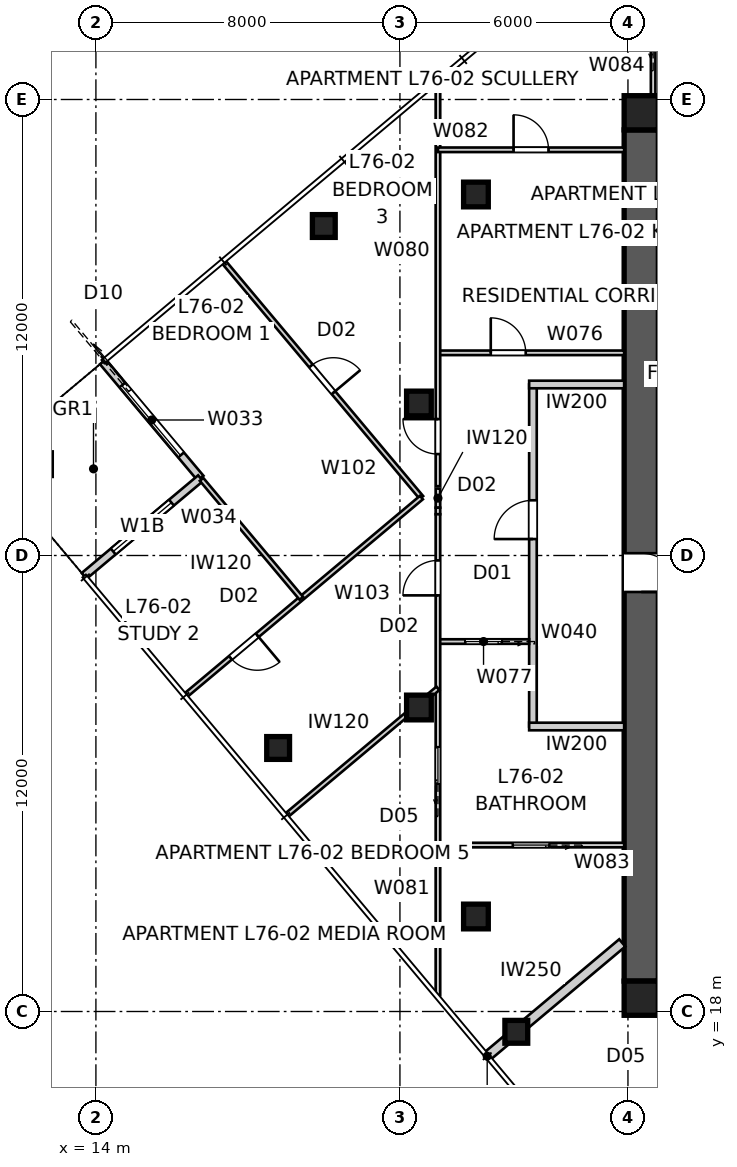
"""IFC4 building model, lengths in metres.
Left out: names, types, materials, properties, quantities, classifications, styles, units other than length and angle.
Written with IfcOpenShell. Run it as: python <this file> out.ifc"""

import sys

from ifc_helpers import new_model, si_unit, direction, frame, frame_2d, origin, origin_2d, place, context, subcontext, project, spatial, polyline, rectangle, outline, extrude, element, fill, save


model = new_model("IFC4")
c1 = context("Model", 3, precision=1e-05, world=origin(), true_north=direction((0.0, 1.0)))
c2 = subcontext(c1, "Body", "Model", "MODEL_VIEW")
j1 = project(units=[si_unit("LENGTHUNIT", "METRE"), si_unit("PLANEANGLEUNIT", "RADIAN")], contexts=[c1])
p1 = place(None, origin())
s1 = spatial("IfcSite", under=j1, at=p1, CompositionType="ELEMENT")
p2 = place(p1, origin())
s2 = spatial("IfcBuilding", under=s1, at=p2, CompositionType="ELEMENT")
p3 = place(p2, frame((0.0, 0.0, 276.0)))
s3 = spatial("IfcBuildingStorey", under=s2, at=p3, CompositionType="ELEMENT", Elevation=276.0)
for number, where, z_axis, x_axis in (
    (1, (28.8, 41.65, 0.0), (0.0, 0.0, 1.0), (1.0, 0.0, 0.0)),
    (2, (51.2, 18.35, 0.0), (0.0, 0.0, 1.0), (-1.0, 0.0, 0.0)),
):
    element("IfcWall", number, at=place(p3, frame(where, z_axis=z_axis, x_axis=x_axis)), inside=s3, PredefinedType="SHEAR", context=c2, shape_type="SweptSolid", body=[
        extrude(outline(polyline([(0.0, -0.45), (22.4, -0.45), (22.4, -0.025), (22.85, -0.025), (22.85, 0.025), (22.4, 0.025), (22.4, 0.45), (0.0, 0.45), (0.0, 0.025), (-0.45, 0.025), (-0.45, -0.025), (0.0, -0.025), (0.0, -0.45)])), origin(), (0.0, 0.0, 1.0), 3.4),
    ])
p4 = place(p3, frame((28.35, 41.2, 0.0), z_axis=(0.0, 0.0, 1.0), x_axis=(0.0, -1.0, 0.0)))
e3 = element("IfcWall", 3, at=p4, inside=s3, PredefinedType="SHEAR", context=c2, shape_type="SweptSolid", body=[
    extrude(outline(polyline([(0.0, -0.45), (22.4, -0.45), (22.4, -0.025), (22.85, -0.025), (22.85, 0.025), (22.4, 0.025), (22.4, 0.45), (0.0, 0.45), (0.0, 0.025), (-0.45, 0.025), (-0.45, -0.025), (0.0, -0.025), (0.0, -0.45)])), origin(), (0.0, 0.0, 1.0), 3.4),
])
p5 = place(p4, frame((11.14, 0.0, 0.0)))
e4 = element("IfcOpeningElement", 4, at=p5, cuts=e3, PredefinedType="OPENING", context=c2, shape_type="SweptSolid", body=[
    extrude(rectangle(XDim=1.02, YDim=2.4, at=frame_2d((0.51, 1.2))), frame((0.0, 0.46, 0.0), z_axis=(0.0, -1.0, 0.0), x_axis=(1.0, 0.0, 0.0)), (0.0, 0.0, 1.0), 0.92),
])
for number, where, z_axis, x_axis in (
    (5, (28.35, 18.35, 0.0), (0.0, 0.0, 1.0), (1.0, 0.0, 0.0)),
    (6, (28.35, 41.65, 0.0), (0.0, 0.0, 1.0), (1.0, 0.0, 0.0)),
):
    element("IfcColumn", number, at=place(p3, frame(where, z_axis=z_axis, x_axis=x_axis)), inside=s3, PredefinedType="COLUMN", context=c2, shape_type="SweptSolid", body=[
        extrude(rectangle(XDim=0.9, YDim=0.9, at=origin_2d()), origin(), (0.0, 0.0, 1.0), 3.4),
    ])
for number, where, z_axis, x_axis in (
    (7, (19.997, 38.671, 0.0), (0.0, 0.0, 1.0), (1.0, 0.0, 0.0)),
    (8, (18.795, 24.935, 0.0), (0.0, 0.0, 1.0), (1.0, 0.0, 0.0)),
    (9, (25.062, 17.466, 0.0), (0.0, 0.0, 1.0), (1.0, 0.0, 0.0)),
):
    element("IfcColumn", number, at=place(p3, frame(where, z_axis=z_axis, x_axis=x_axis)), inside=s3, PredefinedType="COLUMN", context=c2, shape_type="SweptSolid", body=[
        extrude(rectangle(XDim=0.6, YDim=0.6, at=origin_2d()), origin(), (0.0, 0.0, 1.0), 3.4),
    ])
for number, where, z_axis, x_axis in (
    (10, (24.0, 39.5, 0.0), (0.0, 0.0, 1.0), (1.0, 0.0, 0.0)),
    (11, (22.5, 34.0, 0.0), (0.0, 0.0, 1.0), (1.0, 0.0, 0.0)),
    (12, (22.5, 26.0, 0.0), (0.0, 0.0, 1.0), (1.0, 0.0, 0.0)),
    (13, (24.0, 20.5, 0.0), (0.0, 0.0, 1.0), (1.0, 0.0, 0.0)),
):
    element("IfcColumn", number, at=place(p3, frame(where, z_axis=z_axis, x_axis=x_axis)), inside=s3, PredefinedType="COLUMN", context=c2, shape_type="SweptSolid", body=[
        extrude(rectangle(XDim=0.65, YDim=0.65, at=origin_2d()), origin(), (0.0, 0.0, 1.0), 3.4),
    ])
p6 = place(p3, frame((14.183, 35.098, 0.0), z_axis=(0.0, 0.0, 1.0), x_axis=(0.642768287094, -0.766060656284, 0.0)))
e14 = element("IfcWall", 14, at=p6, inside=s3, PredefinedType="SOLIDWALL", context=c2, shape_type="SweptSolid", body=[
    extrude(rectangle(XDim=4.0, YDim=0.2, at=frame_2d((2.0, 0.0))), origin(), (0.0, 0.0, 1.0), 3.25),
])
p7 = place(p6, frame((0.8, 0.0, 0.0)))
e15 = element("IfcOpeningElement", 15, at=p7, cuts=e14, PredefinedType="OPENING", context=c2, shape_type="SweptSolid", body=[
    extrude(rectangle(XDim=2.4, YDim=2.4, at=frame_2d((1.2, 1.2))), frame((0.0, 0.11, 0.0), z_axis=(0.0, -1.0, 0.0), x_axis=(1.0, 0.0, 0.0)), (0.0, 0.0, 1.0), 0.22),
])
p8 = place(p3, frame((16.754, 32.034, 0.0), z_axis=(0.0, 0.0, 1.0), x_axis=(-0.766035437498, -0.642798342015, 0.0)))
e16 = element("IfcWall", 16, at=p8, inside=s3, PredefinedType="SOLIDWALL", context=c2, shape_type="SweptSolid", body=[
    extrude(rectangle(XDim=4.0, YDim=0.2, at=frame_2d((2.0, 0.0))), origin(), (0.0, 0.0, 1.0), 3.25),
])
p9 = place(p8, frame((1.0, 0.0, 0.45)))
e17 = element("IfcOpeningElement", 17, at=p9, cuts=e16, PredefinedType="OPENING", context=c2, shape_type="SweptSolid", body=[
    extrude(rectangle(XDim=2.0, YDim=1.8, at=frame_2d((1.0, 0.9))), frame((0.0, 0.11, 0.0), z_axis=(0.0, -1.0, 0.0), x_axis=(1.0, 0.0, 0.0)), (0.0, 0.0, 1.0), 0.22),
])
p10 = place(p3, frame((25.5, 25.5, 0.0), z_axis=(0.0, 0.0, 1.0), x_axis=(0.0, 1.0, 0.0)))
e18 = element("IfcWall", 18, at=p10, inside=s3, PredefinedType="PARTITIONING", context=c2, shape_type="SweptSolid", body=[
    extrude(rectangle(XDim=9.0, YDim=0.2, at=frame_2d((4.5, 0.0))), origin(), (0.0, 0.0, 1.0), 3.25),
])
p11 = place(p10, frame((4.933, 0.0, 0.0)))
e19 = element("IfcOpeningElement", 19, at=p11, cuts=e18, PredefinedType="OPENING", context=c2, shape_type="SweptSolid", body=[
    extrude(rectangle(XDim=1.02, YDim=2.34, at=frame_2d((0.51, 1.17))), frame((0.0, 0.11, 0.0), z_axis=(0.0, -1.0, 0.0), x_axis=(1.0, 0.0, 0.0)), (0.0, 0.0, 1.0), 0.22),
])
for number, where, z_axis, x_axis in (
    (20, (27.9, 34.5, 0.0), (0.0, 0.0, 1.0), (-1.0, 0.0, 0.0)),
    (21, (27.9, 25.5, 0.0), (0.0, 0.0, 1.0), (-1.0, 0.0, 0.0)),
):
    element("IfcWall", number, at=place(p3, frame(where, z_axis=z_axis, x_axis=x_axis)), inside=s3, PredefinedType="PARTITIONING", context=c2, shape_type="SweptSolid", body=[
        extrude(rectangle(XDim=2.5, YDim=0.2, at=frame_2d((1.25, 0.0))), origin(), (0.0, 0.0, 1.0), 3.25),
    ])
p12 = place(p3, frame((24.296, 16.823, 0.0), z_axis=(0.0, 0.0, 1.0), x_axis=(0.76603440109, 0.64279957712, 0.0)))
e22 = element("IfcWall", 22, at=p12, inside=s3, PredefinedType="PARTITIONING", context=c2, shape_type="SweptSolid", body=[
    extrude(rectangle(XDim=4.64, YDim=0.25, at=frame_2d((2.32, 0.0))), origin(), (0.0, 0.0, 1.0), 3.25),
])
p13 = place(p3, frame((23.0, 35.333, 0.0), z_axis=(0.0, 0.0, 1.0), x_axis=(1.0, 0.0, 0.0)))
e23 = element("IfcWall", 23, at=p13, inside=s3, PredefinedType="PARTITIONING", context=c2, shape_type="SweptSolid", body=[
    extrude(rectangle(XDim=4.9, YDim=0.12, at=frame_2d((2.45, 0.0))), origin(), (0.0, 0.0, 1.0), 3.25),
])
p14 = place(p13, frame((1.39, 0.0, 0.0)))
e24 = element("IfcOpeningElement", 24, at=p14, cuts=e23, PredefinedType="OPENING", context=c2, shape_type="SweptSolid", body=[
    extrude(rectangle(XDim=0.92, YDim=2.34, at=frame_2d((0.46, 1.17))), frame((0.0, 0.07, 0.0), z_axis=(0.0, -1.0, 0.0), x_axis=(1.0, 0.0, 0.0)), (0.0, 0.0, 1.0), 0.14),
])
p15 = place(p3, frame((25.4, 27.736, 0.0), z_axis=(0.0, 0.0, 1.0), x_axis=(-1.0, 0.0, 0.0)))
e25 = element("IfcWall", 25, at=p15, inside=s3, PredefinedType="PARTITIONING", context=c2, shape_type="SweptSolid", body=[
    extrude(rectangle(XDim=2.4, YDim=0.12, at=frame_2d((1.2, 0.0))), origin(), (0.0, 0.0, 1.0), 3.25),
])
p16 = place(p15, frame((0.72, 0.0, 0.0)))
e26 = element("IfcOpeningElement", 26, at=p16, cuts=e25, PredefinedType="OPENING", context=c2, shape_type="SweptSolid", body=[
    extrude(rectangle(XDim=0.96, YDim=2.1, at=frame_2d((0.48, 1.05))), frame((0.0, 0.07, 0.0), z_axis=(0.0, -1.0, 0.0), x_axis=(1.0, 0.0, 0.0)), (0.0, 0.0, 1.0), 0.14),
])
p17 = place(p3, frame((23.0, 31.258, 0.0), z_axis=(0.0, 0.0, 1.0), x_axis=(0.0, 1.0, 0.0)))
e27 = element("IfcWall", 27, at=p17, inside=s3, PredefinedType="PARTITIONING", context=c2, shape_type="SweptSolid", body=[
    extrude(rectangle(XDim=0.504, YDim=0.12, at=frame_2d((0.252, 0.0))), origin(), (0.0, 0.0, 1.0), 3.25),
])
p18 = place(p3, frame((23.0, 31.824, 0.0), z_axis=(0.0, 0.0, 1.0), x_axis=(0.0, 1.0, 0.0)))
e28 = element("IfcWall", 28, at=p18, inside=s3, PredefinedType="PARTITIONING", context=c2, shape_type="SweptSolid", body=[
    extrude(rectangle(XDim=10.619, YDim=0.12, at=frame_2d((5.31, 0.0))), origin(), (0.0, 0.0, 1.0), 2.549),
])
p19 = place(p18, frame((0.844, 0.0, 0.0)))
e29 = element("IfcOpeningElement", 29, at=p19, cuts=e28, PredefinedType="OPENING", context=c2, shape_type="SweptSolid", body=[
    extrude(rectangle(XDim=0.92, YDim=2.34, at=frame_2d((0.46, 1.17))), frame((0.0, 0.07, 0.0), z_axis=(0.0, -1.0, 0.0), x_axis=(1.0, 0.0, 0.0)), (0.0, 0.0, 1.0), 0.14),
])
p20 = place(p3, frame((23.0, 18.43, 0.0), z_axis=(0.0, 0.0, 1.0), x_axis=(0.0, 1.0, 0.0)))
e30 = element("IfcWall", 30, at=p20, inside=s3, PredefinedType="PARTITIONING", context=c2, shape_type="SweptSolid", body=[
    extrude(rectangle(XDim=12.656, YDim=0.12, at=frame_2d((6.328, 0.0))), origin(), (0.0, 0.0, 1.0), 2.549),
])
p21 = place(p20, frame((10.521, 0.0, 0.0)))
e31 = element("IfcOpeningElement", 31, at=p21, cuts=e30, PredefinedType="OPENING", context=c2, shape_type="SweptSolid", body=[
    extrude(rectangle(XDim=0.92, YDim=2.34, at=frame_2d((0.46, 1.17))), frame((0.0, 0.07, 0.0), z_axis=(0.0, -1.0, 0.0), x_axis=(1.0, 0.0, 0.0)), (0.0, 0.0, 1.0), 0.14),
])
p22 = place(p20, frame((5.565, 0.0, 0.0)))
e32 = element("IfcOpeningElement", 32, at=p22, cuts=e30, PredefinedType="OPENING", context=c2, shape_type="SweptSolid", body=[
    extrude(rectangle(XDim=0.96, YDim=2.1, at=frame_2d((0.48, 1.05))), frame((0.0, 0.07, 0.0), z_axis=(0.0, -1.0, 0.0), x_axis=(1.0, 0.0, 0.0)), (0.0, 0.0, 1.0), 0.14),
])
p23 = place(p3, frame((23.0, 40.676, 0.0), z_axis=(0.0, 0.0, 1.0), x_axis=(1.0, 0.0, 0.0)))
e33 = element("IfcWall", 33, at=p23, inside=s3, PredefinedType="PARTITIONING", context=c2, shape_type="SweptSolid", body=[
    extrude(rectangle(XDim=4.9, YDim=0.12, at=frame_2d((2.45, 0.0))), origin(), (0.0, 0.0, 1.0), 3.25),
])
p24 = place(p23, frame((1.99, 0.0, 0.0)))
e34 = element("IfcOpeningElement", 34, at=p24, cuts=e33, PredefinedType="OPENING", context=c2, shape_type="SweptSolid", body=[
    extrude(rectangle(XDim=0.92, YDim=2.1, at=frame_2d((0.46, 1.05))), frame((0.0, 0.07, 0.0), z_axis=(0.0, -1.0, 0.0), x_axis=(1.0, 0.0, 0.0)), (0.0, 0.0, 1.0), 0.14),
])
p25 = place(p3, frame((27.9, 22.38, 0.0), z_axis=(0.0, 0.0, 1.0), x_axis=(-1.0, 0.0, 0.0)))
e35 = element("IfcWall", 35, at=p25, inside=s3, PredefinedType="PARTITIONING", context=c2, shape_type="SweptSolid", body=[
    extrude(rectangle(XDim=4.9, YDim=0.12, at=frame_2d((2.45, 0.0))), origin(), (0.0, 0.0, 1.0), 3.25),
])
p26 = place(p25, frame((1.97, 0.0, 0.0)))
e36 = element("IfcOpeningElement", 36, at=p26, cuts=e35, PredefinedType="OPENING", context=c2, shape_type="SweptSolid", body=[
    extrude(rectangle(XDim=0.96, YDim=2.1, at=frame_2d((0.48, 1.05))), frame((0.0, 0.07, 0.0), z_axis=(0.0, -1.0, 0.0), x_axis=(1.0, 0.0, 0.0)), (0.0, 0.0, 1.0), 0.14),
])
p27 = place(p3, frame((28.663, 41.18, 0.0), z_axis=(0.0, 0.0, 1.0), x_axis=(0.0, 1.0, 0.0)))
e37 = element("IfcWall", 37, at=p27, inside=s3, PredefinedType="PARTITIONING", context=c2, shape_type="SweptSolid", body=[
    extrude(rectangle(XDim=5.82, YDim=0.12, at=frame_2d((2.91, 0.0))), origin(), (0.0, 0.0, 1.0), 3.25),
])
p28 = place(p27, frame((2.44, 0.0, 0.0)))
e38 = element("IfcOpeningElement", 38, at=p28, cuts=e37, PredefinedType="OPENING", context=c2, shape_type="SweptSolid", body=[
    extrude(rectangle(XDim=0.96, YDim=2.1, at=frame_2d((0.48, 1.05))), frame((0.0, 0.07, 0.0), z_axis=(0.0, -1.0, 0.0), x_axis=(1.0, 0.0, 0.0)), (0.0, 0.0, 1.0), 0.14),
])
p29 = place(p3, frame((17.369, 37.719, 0.0), z_axis=(0.0, 0.0, 1.0), x_axis=(0.642800378028, -0.766033729027, 0.0)))
e39 = element("IfcWall", 39, at=p29, inside=s3, PredefinedType="PARTITIONING", context=c2, shape_type="SweptSolid", body=[
    extrude(rectangle(XDim=8.085, YDim=0.12, at=frame_2d((4.042, 0.0))), origin(), (0.0, 0.0, 1.0), 3.25),
])
p30 = place(p29, frame((3.562, 0.0, 0.0)))
e40 = element("IfcOpeningElement", 40, at=p30, cuts=e39, PredefinedType="OPENING", context=c2, shape_type="SweptSolid", body=[
    extrude(rectangle(XDim=0.92, YDim=2.34, at=frame_2d((0.46, 1.17))), frame((0.0, 0.07, 0.0), z_axis=(0.0, -1.0, 0.0), x_axis=(1.0, 0.0, 0.0)), (0.0, 0.0, 1.0), 0.14),
])
p31 = place(p3, frame((22.566, 31.525, 0.0), z_axis=(0.0, 0.0, 1.0), x_axis=(-0.766033729027, -0.642800378028, 0.0)))
e41 = element("IfcWall", 41, at=p31, inside=s3, PredefinedType="PARTITIONING", context=c2, shape_type="SweptSolid", body=[
    extrude(rectangle(XDim=8.085, YDim=0.12, at=frame_2d((4.042, 0.0))), origin(), (0.0, 0.0, 1.0), 3.25),
])
p32 = place(p31, frame((5.64, 0.0, 0.0)))
e42 = element("IfcOpeningElement", 42, at=p32, cuts=e41, PredefinedType="OPENING", context=c2, shape_type="SweptSolid", body=[
    extrude(rectangle(XDim=0.92, YDim=2.34, at=frame_2d((0.46, 1.17))), frame((0.0, 0.07, 0.0), z_axis=(0.0, -1.0, 0.0), x_axis=(1.0, 0.0, 0.0)), (0.0, 0.0, 1.0), 0.14),
])
p33 = place(p3, frame((19.406, 28.874, 0.0), z_axis=(0.0, 0.0, 1.0), x_axis=(-0.642767300664, 0.766061483953, 0.0)))
e43 = element("IfcWall", 43, at=p33, inside=s3, PredefinedType="PARTITIONING", context=c2, shape_type="SweptSolid", body=[
    extrude(rectangle(XDim=4.085, YDim=0.12, at=frame_2d((2.042, 0.0))), origin(), (0.0, 0.0, 1.0), 3.25),
])
p34 = place(p3, frame((23.0, 26.505, 0.0), z_axis=(0.0, 0.0, 1.0), x_axis=(-0.76605407051, -0.642776136034, 0.0)))
e44 = element("IfcWall", 44, at=p34, inside=s3, PredefinedType="PARTITIONING", context=c2, shape_type="SweptSolid", body=[
    extrude(rectangle(XDim=5.191, YDim=0.12, at=frame_2d((2.595, 0.0))), origin(), (0.0, 0.0, 1.0), 3.25),
])
p35 = place(p3, frame((23.0, 31.258, 0.0), z_axis=(0.0, 0.0, 1.0), x_axis=(0.0, -1.0, 0.0)))
e45 = element("IfcWall", 45, at=p35, inside=s3, PredefinedType="PARTITIONING", context=c2, shape_type="SweptSolid", body=[
    extrude(rectangle(XDim=0.172, YDim=0.12, at=frame_2d((0.086, 0.0))), origin(), (0.0, 0.0, 1.0), 3.25),
])
p36 = place(p7, origin())
e46 = element("IfcDoor", 46, at=p36, inside=s3, OperationType="SLIDING_TO_LEFT", PredefinedType="DOOR", context=c2, shape_type="SweptSolid", body=[
    extrude(rectangle(XDim=2.4, YDim=2.4, at=frame_2d((1.2, 1.2))), frame((0.0, 0.025, 0.0), z_axis=(0.0, -1.0, 0.0), x_axis=(1.0, 0.0, 0.0)), (0.0, 0.0, 1.0), 0.05),
])
fill(e15, e46)
p37 = place(p9, origin())
e47 = element("IfcWindow", 47, at=p37, inside=s3, PartitioningType="SINGLE_PANEL", PredefinedType="WINDOW", context=c2, shape_type="SweptSolid", body=[
    extrude(rectangle(XDim=2.0, YDim=1.8, at=frame_2d((1.0, 0.9))), frame((0.0, 0.03, 0.0), z_axis=(0.0, -1.0, 0.0), x_axis=(1.0, 0.0, 0.0)), (0.0, 0.0, 1.0), 0.06),
])
fill(e17, e47)
p38 = place(p11, origin())
e48 = element("IfcDoor", 48, at=p38, inside=s3, OperationType="SINGLE_SWING_LEFT", PredefinedType="DOOR", context=c2, shape_type="SweptSolid", body=[
    extrude(rectangle(XDim=1.02, YDim=2.34, at=frame_2d((0.51, 1.17))), frame((0.0, 0.025, 0.0), z_axis=(0.0, -1.0, 0.0), x_axis=(1.0, 0.0, 0.0)), (0.0, 0.0, 1.0), 0.05),
])
fill(e19, e48)
p39 = place(p14, origin())
e49 = element("IfcDoor", 49, at=p39, inside=s3, OperationType="SINGLE_SWING_LEFT", PredefinedType="DOOR", context=c2, shape_type="SweptSolid", body=[
    extrude(rectangle(XDim=0.92, YDim=2.34, at=frame_2d((0.46, 1.17))), frame((0.0, 0.025, 0.0), z_axis=(0.0, -1.0, 0.0), x_axis=(1.0, 0.0, 0.0)), (0.0, 0.0, 1.0), 0.05),
])
fill(e24, e49)
p40 = place(p19, origin())
e50 = element("IfcDoor", 50, at=p40, inside=s3, OperationType="SINGLE_SWING_RIGHT", PredefinedType="DOOR", context=c2, shape_type="SweptSolid", body=[
    extrude(rectangle(XDim=0.92, YDim=2.34, at=frame_2d((0.46, 1.17))), frame((0.0, 0.025, 0.0), z_axis=(0.0, -1.0, 0.0), x_axis=(1.0, 0.0, 0.0)), (0.0, 0.0, 1.0), 0.05),
])
fill(e29, e50)
p41 = place(p21, origin())
e51 = element("IfcDoor", 51, at=p41, inside=s3, OperationType="SINGLE_SWING_LEFT", PredefinedType="DOOR", context=c2, shape_type="SweptSolid", body=[
    extrude(rectangle(XDim=0.92, YDim=2.34, at=frame_2d((0.46, 1.17))), frame((0.0, 0.025, 0.0), z_axis=(0.0, -1.0, 0.0), x_axis=(1.0, 0.0, 0.0)), (0.0, 0.0, 1.0), 0.05),
])
fill(e31, e51)
p42 = place(p16, origin())
e52 = element("IfcDoor", 52, at=p42, inside=s3, OperationType="SLIDING_TO_LEFT", PredefinedType="DOOR", context=c2, shape_type="SweptSolid", body=[
    extrude(rectangle(XDim=0.96, YDim=2.1, at=frame_2d((0.48, 1.05))), frame((0.0, 0.025, 0.0), z_axis=(0.0, -1.0, 0.0), x_axis=(1.0, 0.0, 0.0)), (0.0, 0.0, 1.0), 0.05),
])
fill(e26, e52)
p43 = place(p24, origin())
e53 = element("IfcDoor", 53, at=p43, inside=s3, OperationType="SINGLE_SWING_LEFT", PredefinedType="DOOR", context=c2, shape_type="SweptSolid", body=[
    extrude(rectangle(XDim=0.92, YDim=2.1, at=frame_2d((0.46, 1.05))), frame((0.0, 0.025, 0.0), z_axis=(0.0, -1.0, 0.0), x_axis=(1.0, 0.0, 0.0)), (0.0, 0.0, 1.0), 0.05),
])
fill(e34, e53)
p44 = place(p26, origin())
e54 = element("IfcDoor", 54, at=p44, inside=s3, OperationType="SLIDING_TO_LEFT", PredefinedType="DOOR", context=c2, shape_type="SweptSolid", body=[
    extrude(rectangle(XDim=0.96, YDim=2.1, at=frame_2d((0.48, 1.05))), frame((0.0, 0.025, 0.0), z_axis=(0.0, -1.0, 0.0), x_axis=(1.0, 0.0, 0.0)), (0.0, 0.0, 1.0), 0.05),
])
fill(e36, e54)
p45 = place(p22, origin())
e55 = element("IfcDoor", 55, at=p45, inside=s3, OperationType="SLIDING_TO_LEFT", PredefinedType="DOOR", context=c2, shape_type="SweptSolid", body=[
    extrude(rectangle(XDim=0.96, YDim=2.1, at=frame_2d((0.48, 1.05))), frame((0.0, 0.025, 0.0), z_axis=(0.0, -1.0, 0.0), x_axis=(1.0, 0.0, 0.0)), (0.0, 0.0, 1.0), 0.05),
])
fill(e32, e55)
p46 = place(p30, origin())
e56 = element("IfcDoor", 56, at=p46, inside=s3, OperationType="SINGLE_SWING_RIGHT", PredefinedType="DOOR", context=c2, shape_type="SweptSolid", body=[
    extrude(rectangle(XDim=0.92, YDim=2.34, at=frame_2d((0.46, 1.17))), frame((0.0, 0.025, 0.0), z_axis=(0.0, -1.0, 0.0), x_axis=(1.0, 0.0, 0.0)), (0.0, 0.0, 1.0), 0.05),
])
fill(e40, e56)
p47 = place(p32, origin())
e57 = element("IfcDoor", 57, at=p47, inside=s3, OperationType="SINGLE_SWING_LEFT", PredefinedType="DOOR", context=c2, shape_type="SweptSolid", body=[
    extrude(rectangle(XDim=0.92, YDim=2.34, at=frame_2d((0.46, 1.17))), frame((0.0, 0.025, 0.0), z_axis=(0.0, -1.0, 0.0), x_axis=(1.0, 0.0, 0.0)), (0.0, 0.0, 1.0), 0.05),
])
fill(e42, e57)
p48 = place(p5, origin())
e58 = element("IfcDoor", 58, at=p48, inside=s3, OperationType="SINGLE_SWING_RIGHT", PredefinedType="DOOR", context=c2, shape_type="SweptSolid", body=[
    extrude(rectangle(XDim=1.02, YDim=2.4, at=frame_2d((0.51, 1.2))), frame((0.0, 0.025, 0.0), z_axis=(0.0, -1.0, 0.0), x_axis=(1.0, 0.0, 0.0)), (0.0, 0.0, 1.0), 0.05),
])
fill(e4, e58)
save(model, sys.argv[1])
